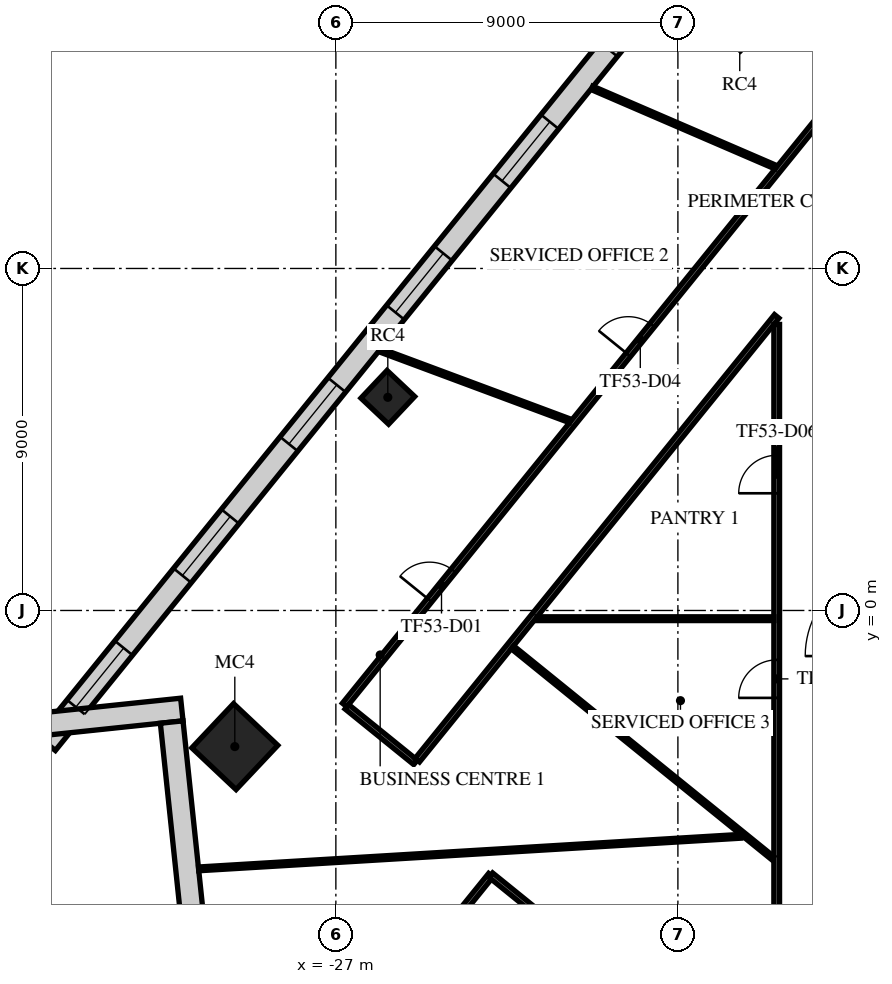
"""IFC4 building model, lengths in metres.
Left out: names, types, materials, properties, quantities, classifications, styles, units other than length and angle.
Written with IfcOpenShell. Run it as: python <this file> out.ifc"""

import sys

from ifc_helpers import new_model, si_unit, direction, frame, frame_2d, origin, origin_2d, place, context, subcontext, project, spatial, rectangle, extrude, element, fill, save


model = new_model("IFC4")
c1 = context("Model", 3, precision=1e-05, world=origin(), true_north=direction((0.0, 1.0)))
c2 = subcontext(c1, "Body", "Model", "MODEL_VIEW")
j1 = project(units=[si_unit("LENGTHUNIT", "METRE"), si_unit("PLANEANGLEUNIT", "RADIAN")], contexts=[c1])
p1 = place(None, origin())
s1 = spatial("IfcSite", under=j1, at=p1, CompositionType="ELEMENT")
p2 = place(p1, origin())
s2 = spatial("IfcBuilding", under=s1, at=p2, CompositionType="ELEMENT")
p3 = place(p2, frame((0.0, 0.0, 225.3)))
s3 = spatial("IfcBuildingStorey", under=s2, at=p3, CompositionType="ELEMENT", Elevation=225.3)
p4 = place(p3, frame((-25.633, 5.609, 0.0), z_axis=(0.0, 0.0, 1.0), x_axis=(0.685916152371, 0.727680583715, 0.0)))
e1 = element("IfcColumn", 1, at=p4, inside=s3, PredefinedType="COLUMN", context=c2, shape_type="SweptSolid", body=[
    extrude(rectangle(XDim=1.0, YDim=1.0, at=origin_2d()), origin(), (0.0, 0.0, 1.0), 4.0),
])
p5 = place(p3, frame((-29.659, -3.582, 0.0), z_axis=(0.0, 0.0, 1.0), x_axis=(0.685916152371, 0.727680583715, 0.0)))
e2 = element("IfcColumn", 2, at=p5, inside=s3, PredefinedType="COLUMN", context=c2, shape_type="SweptSolid", body=[
    extrude(rectangle(XDim=1.6, YDim=1.6, at=origin_2d()), origin(), (0.0, 0.0, 1.0), 4.0),
])
p6 = place(p3, frame((-3.777, 34.584, 0.0), z_axis=(0.0, 0.0, 1.0), x_axis=(-0.629323778295, -0.777143218508, 0.0)))
e3 = element("IfcWall", 3, at=p6, inside=s3, PredefinedType="STANDARD", context=c2, shape_type="SweptSolid", body=[
    extrude(rectangle(XDim=49.0, YDim=0.6, at=frame_2d((24.5, 0.0))), origin(), (0.0, 0.0, 1.0), 3.62),
])
p7 = place(p6, frame((1.227, 0.0, 0.9)))
e4 = element("IfcOpeningElement", 4, at=p7, cuts=e3, PredefinedType="OPENING", context=c2, shape_type="SweptSolid", body=[
    extrude(rectangle(XDim=2.0, YDim=2.1, at=frame_2d((1.0, 1.05))), frame((0.0, 0.31, 0.0), z_axis=(0.0, -1.0, 0.0), x_axis=(1.0, 0.0, 0.0)), (0.0, 0.0, 1.0), 0.62),
])
p8 = place(p6, frame((5.682, 0.0, 0.9)))
e5 = element("IfcOpeningElement", 5, at=p8, cuts=e3, PredefinedType="OPENING", context=c2, shape_type="SweptSolid", body=[
    extrude(rectangle(XDim=2.0, YDim=2.1, at=frame_2d((1.0, 1.05))), frame((0.0, 0.31, 0.0), z_axis=(0.0, -1.0, 0.0), x_axis=(1.0, 0.0, 0.0)), (0.0, 0.0, 1.0), 0.62),
])
p9 = place(p6, frame((10.136, 0.0, 0.9)))
e6 = element("IfcOpeningElement", 6, at=p9, cuts=e3, PredefinedType="OPENING", context=c2, shape_type="SweptSolid", body=[
    extrude(rectangle(XDim=2.0, YDim=2.1, at=frame_2d((1.0, 1.05))), frame((0.0, 0.31, 0.0), z_axis=(0.0, -1.0, 0.0), x_axis=(1.0, 0.0, 0.0)), (0.0, 0.0, 1.0), 0.62),
])
p10 = place(p6, frame((14.591, 0.0, 0.9)))
e7 = element("IfcOpeningElement", 7, at=p10, cuts=e3, PredefinedType="OPENING", context=c2, shape_type="SweptSolid", body=[
    extrude(rectangle(XDim=2.0, YDim=2.1, at=frame_2d((1.0, 1.05))), frame((0.0, 0.31, 0.0), z_axis=(0.0, -1.0, 0.0), x_axis=(1.0, 0.0, 0.0)), (0.0, 0.0, 1.0), 0.62),
])
p11 = place(p6, frame((19.045, 0.0, 0.9)))
e8 = element("IfcOpeningElement", 8, at=p11, cuts=e3, PredefinedType="OPENING", context=c2, shape_type="SweptSolid", body=[
    extrude(rectangle(XDim=2.0, YDim=2.1, at=frame_2d((1.0, 1.05))), frame((0.0, 0.31, 0.0), z_axis=(0.0, -1.0, 0.0), x_axis=(1.0, 0.0, 0.0)), (0.0, 0.0, 1.0), 0.62),
])
p12 = place(p6, frame((23.5, 0.0, 0.9)))
e9 = element("IfcOpeningElement", 9, at=p12, cuts=e3, PredefinedType="OPENING", context=c2, shape_type="SweptSolid", body=[
    extrude(rectangle(XDim=2.0, YDim=2.1, at=frame_2d((1.0, 1.05))), frame((0.0, 0.31, 0.0), z_axis=(0.0, -1.0, 0.0), x_axis=(1.0, 0.0, 0.0)), (0.0, 0.0, 1.0), 0.62),
])
p13 = place(p6, frame((27.955, 0.0, 0.9)))
e10 = element("IfcOpeningElement", 10, at=p13, cuts=e3, PredefinedType="OPENING", context=c2, shape_type="SweptSolid", body=[
    extrude(rectangle(XDim=2.0, YDim=2.1, at=frame_2d((1.0, 1.05))), frame((0.0, 0.31, 0.0), z_axis=(0.0, -1.0, 0.0), x_axis=(1.0, 0.0, 0.0)), (0.0, 0.0, 1.0), 0.62),
])
p14 = place(p6, frame((32.409, 0.0, 0.9)))
e11 = element("IfcOpeningElement", 11, at=p14, cuts=e3, PredefinedType="OPENING", context=c2, shape_type="SweptSolid", body=[
    extrude(rectangle(XDim=2.0, YDim=2.1, at=frame_2d((1.0, 1.05))), frame((0.0, 0.31, 0.0), z_axis=(0.0, -1.0, 0.0), x_axis=(1.0, 0.0, 0.0)), (0.0, 0.0, 1.0), 0.62),
])
p15 = place(p6, frame((36.864, 0.0, 0.9)))
e12 = element("IfcOpeningElement", 12, at=p15, cuts=e3, PredefinedType="OPENING", context=c2, shape_type="SweptSolid", body=[
    extrude(rectangle(XDim=2.0, YDim=2.1, at=frame_2d((1.0, 1.05))), frame((0.0, 0.31, 0.0), z_axis=(0.0, -1.0, 0.0), x_axis=(1.0, 0.0, 0.0)), (0.0, 0.0, 1.0), 0.62),
])
p16 = place(p6, frame((41.318, 0.0, 0.9)))
e13 = element("IfcOpeningElement", 13, at=p16, cuts=e3, PredefinedType="OPENING", context=c2, shape_type="SweptSolid", body=[
    extrude(rectangle(XDim=2.0, YDim=2.1, at=frame_2d((1.0, 1.05))), frame((0.0, 0.31, 0.0), z_axis=(0.0, -1.0, 0.0), x_axis=(1.0, 0.0, 0.0)), (0.0, 0.0, 1.0), 0.62),
])
p17 = place(p6, frame((45.773, 0.0, 0.9)))
e14 = element("IfcOpeningElement", 14, at=p17, cuts=e3, PredefinedType="OPENING", context=c2, shape_type="SweptSolid", body=[
    extrude(rectangle(XDim=2.0, YDim=2.1, at=frame_2d((1.0, 1.05))), frame((0.0, 0.31, 0.0), z_axis=(0.0, -1.0, 0.0), x_axis=(1.0, 0.0, 0.0)), (0.0, 0.0, 1.0), 0.62),
])
p18 = place(p3, frame((-34.878, -3.009, 0.0), z_axis=(0.0, 0.0, 1.0), x_axis=(0.994521092097, 0.104536105602, 0.0)))
e15 = element("IfcWall", 15, at=p18, inside=s3, PredefinedType="STANDARD", context=c2, shape_type="SweptSolid", body=[
    extrude(rectangle(XDim=3.846, YDim=0.6, at=frame_2d((1.923, 0.0))), origin(), (0.0, 0.0, 1.0), 3.62),
])
p19 = place(p3, frame((-31.32, -2.936, 0.0), z_axis=(0.0, 0.0, 1.0), x_axis=(0.104552439276, -0.994519375096, 0.0)))
e16 = element("IfcWall", 16, at=p19, inside=s3, PredefinedType="STANDARD", context=c2, shape_type="SweptSolid", body=[
    extrude(rectangle(XDim=7.778, YDim=0.6, at=frame_2d((3.889, 0.0))), origin(), (0.0, 0.0, 1.0), 3.62),
])
p20 = place(p19, frame((5.134, 0.0, 0.9)))
e17 = element("IfcOpeningElement", 17, at=p20, cuts=e16, PredefinedType="OPENING", context=c2, shape_type="SweptSolid", body=[
    extrude(rectangle(XDim=1.4, YDim=2.1, at=frame_2d((0.7, 1.05))), frame((0.0, 0.31, 0.0), z_axis=(0.0, -1.0, 0.0), x_axis=(1.0, 0.0, 0.0)), (0.0, 0.0, 1.0), 0.62),
])
p21 = place(p3, frame((-26.769, -2.487, 0.0), z_axis=(0.0, 0.0, 1.0), x_axis=(0.629320703929, 0.777145708092, 0.0)))
e18 = element("IfcWall", 18, at=p21, inside=s3, PredefinedType="PARTITIONING", context=c2, shape_type="SweptSolid", body=[
    extrude(rectangle(XDim=37.558, YDim=0.15, at=frame_2d((18.779, 0.0))), origin(), (0.0, 0.0, 1.0), 2.97),
])
p22 = place(p21, frame((3.55, 0.0, 0.0)))
e19 = element("IfcOpeningElement", 19, at=p22, cuts=e18, PredefinedType="OPENING", context=c2, shape_type="SweptSolid", body=[
    extrude(rectangle(XDim=1.0, YDim=2.1, at=frame_2d((0.5, 1.05))), frame((0.0, 0.085, 0.0), z_axis=(0.0, -1.0, 0.0), x_axis=(1.0, 0.0, 0.0)), (0.0, 0.0, 1.0), 0.17),
])
p23 = place(p21, frame((11.862, 0.0, 0.0)))
e20 = element("IfcOpeningElement", 20, at=p23, cuts=e18, PredefinedType="OPENING", context=c2, shape_type="SweptSolid", body=[
    extrude(rectangle(XDim=1.0, YDim=2.1, at=frame_2d((0.5, 1.05))), frame((0.0, 0.085, 0.0), z_axis=(0.0, -1.0, 0.0), x_axis=(1.0, 0.0, 0.0)), (0.0, 0.0, 1.0), 0.17),
])
p24 = place(p21, frame((21.452, 0.0, 0.0)))
e21 = element("IfcOpeningElement", 21, at=p24, cuts=e18, PredefinedType="OPENING", context=c2, shape_type="SweptSolid", body=[
    extrude(rectangle(XDim=1.0, YDim=2.1, at=frame_2d((0.5, 1.05))), frame((0.0, 0.085, 0.0), z_axis=(0.0, -1.0, 0.0), x_axis=(1.0, 0.0, 0.0)), (0.0, 0.0, 1.0), 0.17),
])
p25 = place(p21, frame((31.223, 0.0, 0.0)))
e22 = element("IfcOpeningElement", 22, at=p25, cuts=e18, PredefinedType="OPENING", context=c2, shape_type="SweptSolid", body=[
    extrude(rectangle(XDim=1.0, YDim=2.1, at=frame_2d((0.5, 1.05))), frame((0.0, 0.085, 0.0), z_axis=(0.0, -1.0, 0.0), x_axis=(1.0, 0.0, 0.0)), (0.0, 0.0, 1.0), 0.17),
])
p26 = place(p21, frame((35.359, 0.0, 0.0)))
e23 = element("IfcOpeningElement", 23, at=p26, cuts=e18, PredefinedType="OPENING", context=c2, shape_type="SweptSolid", body=[
    extrude(rectangle(XDim=1.0, YDim=2.1, at=frame_2d((0.5, 1.05))), frame((0.0, 0.085, 0.0), z_axis=(0.0, -1.0, 0.0), x_axis=(1.0, 0.0, 0.0)), (0.0, 0.0, 1.0), 0.17),
])
p27 = place(p3, frame((-26.711, -2.534, 0.0), z_axis=(0.0, 0.0, 1.0), x_axis=(0.777166601342, -0.62929490206, 0.0)))
e24 = element("IfcWall", 24, at=p27, inside=s3, PredefinedType="PARTITIONING", context=c2, shape_type="SweptSolid", body=[
    extrude(rectangle(XDim=2.325, YDim=0.15, at=frame_2d((1.162, 0.0))), origin(), (0.0, 0.0, 1.0), 3.17),
])
p28 = place(p3, frame((-24.857, -3.939, 0.0), z_axis=(0.0, 0.0, 1.0), x_axis=(0.629334227899, 0.777134756393, 0.0)))
e25 = element("IfcWall", 25, at=p28, inside=s3, PredefinedType="PARTITIONING", context=c2, shape_type="SweptSolid", body=[
    extrude(rectangle(XDim=15.027, YDim=0.15, at=frame_2d((7.513, 0.0))), origin(), (0.0, 0.0, 1.0), 3.17),
])
p29 = place(p3, frame((-24.432, -8.831, 0.0), z_axis=(0.0, 0.0, 1.0), x_axis=(0.629201155621, 0.77724250126, 0.0)))
e26 = element("IfcWall", 26, at=p29, inside=s3, PredefinedType="PARTITIONING", context=c2, shape_type="SweptSolid", body=[
    extrude(rectangle(XDim=2.399, YDim=0.15, at=frame_2d((1.2, 0.0))), origin(), (0.0, 0.0, 1.0), 3.17),
])
p30 = place(p3, frame((-22.922, -6.965, 0.0), z_axis=(0.0, 0.0, 1.0), x_axis=(0.777148029431, -0.629317837306, 0.0)))
e27 = element("IfcWall", 27, at=p30, inside=s3, PredefinedType="PARTITIONING", context=c2, shape_type="SweptSolid", body=[
    extrude(rectangle(XDim=10.627, YDim=0.15, at=frame_2d((5.314, 0.0))), origin(), (0.0, 0.0, 1.0), 3.17),
])
p31 = place(p3, frame((-15.4, -12.7, 0.0), z_axis=(0.0, 0.0, 1.0), x_axis=(0.0, 1.0, 0.0)))
e28 = element("IfcWall", 28, at=p31, inside=s3, PredefinedType="PARTITIONING", context=c2, shape_type="SweptSolid", body=[
    extrude(rectangle(XDim=20.227, YDim=0.15, at=frame_2d((10.114, 0.0))), origin(), (0.0, 0.0, 1.0), 3.17),
])
p32 = place(p31, frame((10.4, 0.0, 0.0)))
e29 = element("IfcOpeningElement", 29, at=p32, cuts=e28, PredefinedType="OPENING", context=c2, shape_type="SweptSolid", body=[
    extrude(rectangle(XDim=1.0, YDim=2.1, at=frame_2d((0.5, 1.05))), frame((0.0, 0.085, 0.0), z_axis=(0.0, -1.0, 0.0), x_axis=(1.0, 0.0, 0.0)), (0.0, 0.0, 1.0), 0.17),
])
p33 = place(p31, frame((15.784, 0.0, 0.0)))
e30 = element("IfcOpeningElement", 30, at=p33, cuts=e28, PredefinedType="OPENING", context=c2, shape_type="SweptSolid", body=[
    extrude(rectangle(XDim=1.0, YDim=2.1, at=frame_2d((0.5, 1.05))), frame((0.0, 0.085, 0.0), z_axis=(0.0, -1.0, 0.0), x_axis=(1.0, 0.0, 0.0)), (0.0, 0.0, 1.0), 0.17),
])
p34 = place(p3, frame((-30.61, -6.8, 0.0), z_axis=(0.0, 0.0, 1.0), x_axis=(0.998198116096, 0.060004341699, 0.0)))
e31 = element("IfcWall", 31, at=p34, inside=s3, PredefinedType="PARTITIONING", context=c2, shape_type="SweptSolid", body=[
    extrude(rectangle(XDim=14.285, YDim=0.1, at=frame_2d((7.143, 0.0))), origin(), (0.0, 0.0, 1.0), 2.97),
])
p35 = place(p3, frame((-25.845, 6.854, 0.0), z_axis=(0.0, 0.0, 1.0), x_axis=(0.937152085017, -0.348921150905, 0.0)))
e32 = element("IfcWall", 32, at=p35, inside=s3, PredefinedType="PARTITIONING", context=c2, shape_type="SweptSolid", body=[
    extrude(rectangle(XDim=5.348, YDim=0.1, at=frame_2d((2.674, 0.0))), origin(), (0.0, 0.0, 1.0), 2.97),
])
p36 = place(p3, frame((-22.355, -0.968, 0.0), z_axis=(0.0, 0.0, 1.0), x_axis=(0.777138402267, -0.629329725757, 0.0)))
e33 = element("IfcWall", 33, at=p36, inside=s3, PredefinedType="PARTITIONING", context=c2, shape_type="SweptSolid", body=[
    extrude(rectangle(XDim=8.812, YDim=0.1, at=frame_2d((4.406, 0.0))), origin(), (0.0, 0.0, 1.0), 3.17),
])
p37 = place(p3, frame((-21.705, -0.216, 0.0), z_axis=(0.0, 0.0, 1.0), x_axis=(1.0, 0.0, 0.0)))
e34 = element("IfcWall", 34, at=p37, inside=s3, PredefinedType="PARTITIONING", context=c2, shape_type="SweptSolid", body=[
    extrude(rectangle(XDim=6.23, YDim=0.1, at=frame_2d((3.115, 0.0))), origin(), (0.0, 0.0, 1.0), 3.62),
])
p38 = place(p3, frame((-20.259, 13.751, 0.0), z_axis=(0.0, 0.0, 1.0), x_axis=(0.918139792182, -0.396256636553, 0.0)))
e35 = element("IfcWall", 35, at=p38, inside=s3, PredefinedType="PARTITIONING", context=c2, shape_type="SweptSolid", body=[
    extrude(rectangle(XDim=5.267, YDim=0.1, at=frame_2d((2.633, 0.0))), origin(), (0.0, 0.0, 1.0), 2.97),
])
p39 = place(p13, origin())
e36 = element("IfcWindow", 36, at=p39, inside=s3, PartitioningType="SINGLE_PANEL", PredefinedType="WINDOW", context=c2, shape_type="SweptSolid", body=[
    extrude(rectangle(XDim=2.0, YDim=2.1, at=frame_2d((1.0, 1.05))), frame((0.0, 0.03, 0.0), z_axis=(0.0, -1.0, 0.0), x_axis=(1.0, 0.0, 0.0)), (0.0, 0.0, 1.0), 0.06),
])
fill(e10, e36)
p40 = place(p14, origin())
e37 = element("IfcWindow", 37, at=p40, inside=s3, PartitioningType="SINGLE_PANEL", PredefinedType="WINDOW", context=c2, shape_type="SweptSolid", body=[
    extrude(rectangle(XDim=2.0, YDim=2.1, at=frame_2d((1.0, 1.05))), frame((0.0, 0.03, 0.0), z_axis=(0.0, -1.0, 0.0), x_axis=(1.0, 0.0, 0.0)), (0.0, 0.0, 1.0), 0.06),
])
fill(e11, e37)
p41 = place(p15, origin())
e38 = element("IfcWindow", 38, at=p41, inside=s3, PartitioningType="SINGLE_PANEL", PredefinedType="WINDOW", context=c2, shape_type="SweptSolid", body=[
    extrude(rectangle(XDim=2.0, YDim=2.1, at=frame_2d((1.0, 1.05))), frame((0.0, 0.03, 0.0), z_axis=(0.0, -1.0, 0.0), x_axis=(1.0, 0.0, 0.0)), (0.0, 0.0, 1.0), 0.06),
])
fill(e12, e38)
p42 = place(p16, origin())
e39 = element("IfcWindow", 39, at=p42, inside=s3, PartitioningType="SINGLE_PANEL", PredefinedType="WINDOW", context=c2, shape_type="SweptSolid", body=[
    extrude(rectangle(XDim=2.0, YDim=2.1, at=frame_2d((1.0, 1.05))), frame((0.0, 0.03, 0.0), z_axis=(0.0, -1.0, 0.0), x_axis=(1.0, 0.0, 0.0)), (0.0, 0.0, 1.0), 0.06),
])
fill(e13, e39)
p43 = place(p17, origin())
e40 = element("IfcWindow", 40, at=p43, inside=s3, PartitioningType="SINGLE_PANEL", PredefinedType="WINDOW", context=c2, shape_type="SweptSolid", body=[
    extrude(rectangle(XDim=2.0, YDim=2.1, at=frame_2d((1.0, 1.05))), frame((0.0, 0.03, 0.0), z_axis=(0.0, -1.0, 0.0), x_axis=(1.0, 0.0, 0.0)), (0.0, 0.0, 1.0), 0.06),
])
fill(e14, e40)
p44 = place(p22, origin())
e41 = element("IfcDoor", 41, at=p44, inside=s3, OperationType="SINGLE_SWING_RIGHT", PredefinedType="DOOR", context=c2, shape_type="SweptSolid", body=[
    extrude(rectangle(XDim=1.0, YDim=2.1, at=frame_2d((0.5, 1.05))), frame((0.0, 0.025, 0.0), z_axis=(0.0, -1.0, 0.0), x_axis=(1.0, 0.0, 0.0)), (0.0, 0.0, 1.0), 0.05),
])
fill(e19, e41)
p45 = place(p23, origin())
e42 = element("IfcDoor", 42, at=p45, inside=s3, OperationType="SINGLE_SWING_LEFT", PredefinedType="DOOR", context=c2, shape_type="SweptSolid", body=[
    extrude(rectangle(XDim=1.0, YDim=2.1, at=frame_2d((0.5, 1.05))), frame((0.0, 0.025, 0.0), z_axis=(0.0, -1.0, 0.0), x_axis=(1.0, 0.0, 0.0)), (0.0, 0.0, 1.0), 0.05),
])
fill(e20, e42)
p46 = place(p32, origin())
e43 = element("IfcDoor", 43, at=p46, inside=s3, OperationType="SINGLE_SWING_RIGHT", PredefinedType="DOOR", context=c2, shape_type="SweptSolid", body=[
    extrude(rectangle(XDim=1.0, YDim=2.1, at=frame_2d((0.5, 1.05))), frame((0.0, 0.025, 0.0), z_axis=(0.0, -1.0, 0.0), x_axis=(1.0, 0.0, 0.0)), (0.0, 0.0, 1.0), 0.05),
])
fill(e29, e43)
p47 = place(p33, origin())
e44 = element("IfcDoor", 44, at=p47, inside=s3, OperationType="SINGLE_SWING_LEFT", PredefinedType="DOOR", context=c2, shape_type="SweptSolid", body=[
    extrude(rectangle(XDim=1.0, YDim=2.1, at=frame_2d((0.5, 1.05))), frame((0.0, 0.025, 0.0), z_axis=(0.0, -1.0, 0.0), x_axis=(1.0, 0.0, 0.0)), (0.0, 0.0, 1.0), 0.05),
])
fill(e30, e44)
save(model, sys.argv[1])
